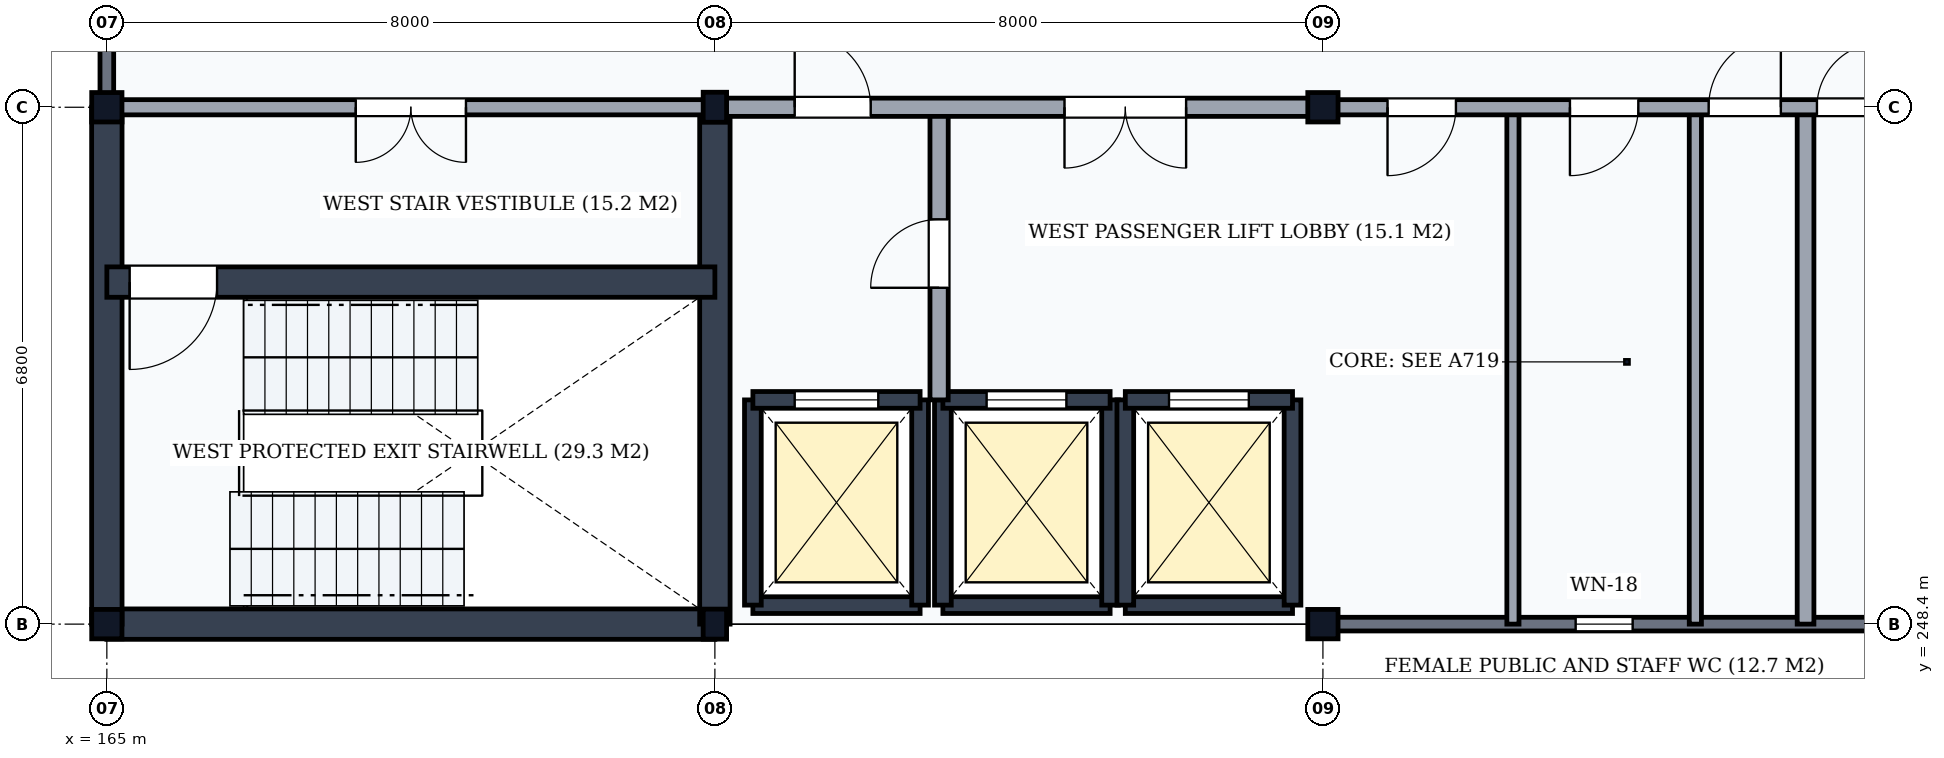
"""IFC4 building model, lengths in metres.
Left out: names, types, materials, properties, quantities, classifications, styles, units other than length and angle.
Written with IfcOpenShell. Run it as: python <this file> out.ifc"""

import sys

from ifc_helpers import new_model, si_unit, direction, frame, frame_2d, origin, origin_2d, place, context, subcontext, project, spatial, rectangle, i_section, extrude, element, fill, save


model = new_model("IFC4")
c1 = context("Model", 3, precision=1e-05, world=origin(), true_north=direction((0.0, 1.0)))
c2 = subcontext(c1, "Body", "Model", "MODEL_VIEW")
j1 = project(units=[si_unit("LENGTHUNIT", "METRE"), si_unit("PLANEANGLEUNIT", "RADIAN")], contexts=[c1])
p1 = place(None, origin())
s1 = spatial("IfcSite", under=j1, at=p1, CompositionType="ELEMENT")
p2 = place(p1, origin())
s2 = spatial("IfcBuilding", under=s1, at=p2, CompositionType="ELEMENT")
p3 = place(p2, frame((0.0, 0.0, 36.0)))
s3 = spatial("IfcBuildingStorey", under=s2, at=p3, CompositionType="ELEMENT", Elevation=36.0)
for number, where, z_axis, x_axis in (
    (1, (165.0, 248.4, 0.0), (0.0, 0.0, 1.0), (1.0, 0.0, 0.0)),
    (2, (165.0, 255.2, 0.0), (0.0, 0.0, 1.0), (1.0, 0.0, 0.0)),
):
    element("IfcColumn", number, at=place(p3, frame(where, z_axis=z_axis, x_axis=x_axis)), inside=s3, PredefinedType="COLUMN", context=c2, shape_type="SweptSolid", body=[
        extrude(i_section(OverallWidth=0.398, OverallDepth=0.387, WebThickness=0.021, FlangeThickness=0.033, FilletRadius=0.015, at=origin_2d()), origin(), (0.0, 0.0, 1.0), 3.9),
    ])
for number, where, z_axis, x_axis in (
    (3, (173.0, 248.4, 0.0), (0.0, 0.0, 1.0), (1.0, 0.0, 0.0)),
    (4, (173.0, 255.2, 0.0), (0.0, 0.0, 1.0), (1.0, 0.0, 0.0)),
):
    element("IfcColumn", number, at=place(p3, frame(where, z_axis=z_axis, x_axis=x_axis)), inside=s3, PredefinedType="COLUMN", context=c2, shape_type="SweptSolid", body=[
        extrude(i_section(OverallWidth=0.308, OverallDepth=0.395, WebThickness=0.021, FlangeThickness=0.04, FilletRadius=0.027, at=origin_2d()), origin(), (0.0, 0.0, 1.0), 3.9),
    ])
for number, where, z_axis, x_axis in (
    (5, (181.0, 248.4, 0.0), (0.0, 0.0, 1.0), (1.0, 0.0, 0.0)),
    (6, (181.0, 255.2, 0.0), (0.0, 0.0, 1.0), (1.0, 0.0, 0.0)),
):
    element("IfcColumn", number, at=place(p3, frame(where, z_axis=z_axis, x_axis=x_axis)), inside=s3, PredefinedType="COLUMN", context=c2, shape_type="SweptSolid", body=[
        extrude(i_section(OverallWidth=0.398, OverallDepth=0.387, WebThickness=0.021, FlangeThickness=0.033, FilletRadius=0.015, at=origin_2d()), origin(), (0.0, 0.0, 1.0), 3.9),
    ])
p4 = place(p3, frame((181.006, 248.4, 0.0), z_axis=(0.0, 0.0, 1.0), x_axis=(1.0, 0.0, 0.0)))
e7 = element("IfcWall", 7, at=p4, inside=s3, PredefinedType="SOLIDWALL", context=c2, shape_type="SweptSolid", body=[
    extrude(rectangle(XDim=7.988, YDim=0.18, at=frame_2d((3.994, 0.0))), origin(), (0.0, 0.0, 1.0), 3.368),
])
p5 = place(p4, frame((3.319, 0.0, 0.85)))
e8 = element("IfcOpeningElement", 8, at=p5, cuts=e7, PredefinedType="OPENING", context=c2, shape_type="SweptSolid", body=[
    extrude(rectangle(XDim=0.75, YDim=2.0, at=frame_2d((0.375, 1.0))), frame((0.0, 0.105, 0.0), z_axis=(0.0, -1.0, 0.0), x_axis=(1.0, 0.0, 0.0)), (0.0, 0.0, 1.0), 0.21),
])
p6 = place(p3, frame((165.0, 255.206, 0.0), z_axis=(0.0, 0.0, 1.0), x_axis=(0.0, 1.0, 0.0)))
e9 = element("IfcWall", 9, at=p6, inside=s3, PredefinedType="SOLIDWALL", context=c2, shape_type="SweptSolid", body=[
    extrude(rectangle(XDim=7.588, YDim=0.18, at=frame_2d((3.794, 0.0))), origin(), (0.0, 0.0, 1.0), 3.408),
])
p7 = place(p3, frame((165.0, 248.4, 0.0), z_axis=(0.0, 0.0, 1.0), x_axis=(1.0, 0.0, 0.0)))
e10 = element("IfcWall", 10, at=p7, inside=s3, PredefinedType="SHEAR", context=c2, shape_type="SweptSolid", body=[
    extrude(rectangle(XDim=8.0, YDim=0.4, at=frame_2d((4.0, 0.0))), origin(), (0.0, 0.0, 1.0), 3.68),
])
for number, where, z_axis, x_axis in (
    (11, (165.0, 248.4, 0.0), (0.0, 0.0, 1.0), (0.0, 1.0, 0.0)),
    (12, (173.0, 248.4, 0.0), (0.0, 0.0, 1.0), (0.0, 1.0, 0.0)),
):
    element("IfcWall", number, at=place(p3, frame(where, z_axis=z_axis, x_axis=x_axis)), inside=s3, PredefinedType="SHEAR", context=c2, shape_type="SweptSolid", body=[
        extrude(rectangle(XDim=6.8, YDim=0.4, at=frame_2d((3.4, 0.0))), origin(), (0.0, 0.0, 1.0), 3.68),
    ])
p8 = place(p3, frame((165.0, 252.9, 0.0), z_axis=(0.0, 0.0, 1.0), x_axis=(1.0, 0.0, 0.0)))
e13 = element("IfcWall", 13, at=p8, inside=s3, PredefinedType="SHEAR", context=c2, shape_type="SweptSolid", body=[
    extrude(rectangle(XDim=8.0, YDim=0.4, at=frame_2d((4.0, 0.0))), origin(), (0.0, 0.0, 1.0), 3.68),
])
p9 = place(p8, frame((0.3, 0.0, 0.0)))
e14 = element("IfcOpeningElement", 14, at=p9, cuts=e13, PredefinedType="OPENING", context=c2, shape_type="SweptSolid", body=[
    extrude(rectangle(XDim=1.15, YDim=2.15, at=frame_2d((0.575, 1.075))), frame((0.0, 0.215, 0.0), z_axis=(0.0, -1.0, 0.0), x_axis=(1.0, 0.0, 0.0)), (0.0, 0.0, 1.0), 0.43),
])
p10 = place(p3, frame((165.0, 255.2, 0.0), z_axis=(0.0, 0.0, 1.0), x_axis=(1.0, 0.0, 0.0)))
e15 = element("IfcWall", 15, at=p10, inside=s3, PredefinedType="PARTITIONING", context=c2, shape_type="SweptSolid", body=[
    extrude(rectangle(XDim=8.0, YDim=0.2, at=frame_2d((4.0, 0.0))), origin(), (0.0, 0.0, 1.0), 3.178),
])
p11 = place(p10, frame((3.275, 0.0, 0.0)))
e16 = element("IfcOpeningElement", 16, at=p11, cuts=e15, PredefinedType="OPENING", context=c2, shape_type="SweptSolid", body=[
    extrude(rectangle(XDim=1.45, YDim=2.2, at=frame_2d((0.725, 1.1))), frame((0.0, 0.115, 0.0), z_axis=(0.0, -1.0, 0.0), x_axis=(1.0, 0.0, 0.0)), (0.0, 0.0, 1.0), 0.23),
])
p12 = place(p3, frame((173.5, 248.65, 0.0), z_axis=(0.0, 0.0, 1.0), x_axis=(1.0, 0.0, 0.0)))
e17 = element("IfcWall", 17, at=p12, inside=s3, PredefinedType="SHEAR", context=c2, shape_type="SweptSolid", body=[
    extrude(rectangle(XDim=2.2, YDim=0.22, at=frame_2d((1.1, 0.0))), origin(), (0.0, 0.0, 1.0), 3.68),
])
for number, where, z_axis, x_axis in (
    (18, (173.5, 248.65, 0.0), (0.0, 0.0, 1.0), (0.0, 1.0, 0.0)),
    (19, (175.7, 248.65, 0.0), (0.0, 0.0, 1.0), (0.0, 1.0, 0.0)),
):
    element("IfcWall", number, at=place(p3, frame(where, z_axis=z_axis, x_axis=x_axis)), inside=s3, PredefinedType="SHEAR", context=c2, shape_type="SweptSolid", body=[
        extrude(rectangle(XDim=2.7, YDim=0.22, at=frame_2d((1.35, 0.0))), origin(), (0.0, 0.0, 1.0), 3.68),
    ])
p13 = place(p3, frame((173.5, 251.35, 0.0), z_axis=(0.0, 0.0, 1.0), x_axis=(1.0, 0.0, 0.0)))
e20 = element("IfcWall", 20, at=p13, inside=s3, PredefinedType="SHEAR", context=c2, shape_type="SweptSolid", body=[
    extrude(rectangle(XDim=2.2, YDim=0.22, at=frame_2d((1.1, 0.0))), origin(), (0.0, 0.0, 1.0), 3.68),
])
p14 = place(p13, frame((0.55, 0.0, 0.0)))
e21 = element("IfcOpeningElement", 21, at=p14, cuts=e20, PredefinedType="OPENING", context=c2, shape_type="SweptSolid", body=[
    extrude(rectangle(XDim=1.1, YDim=2.15, at=frame_2d((0.55, 1.075))), frame((0.0, 0.125, 0.0), z_axis=(0.0, -1.0, 0.0), x_axis=(1.0, 0.0, 0.0)), (0.0, 0.0, 1.0), 0.25),
])
p15 = place(p3, frame((176.0, 248.65, 0.0), z_axis=(0.0, 0.0, 1.0), x_axis=(1.0, 0.0, 0.0)))
e22 = element("IfcWall", 22, at=p15, inside=s3, PredefinedType="SHEAR", context=c2, shape_type="SweptSolid", body=[
    extrude(rectangle(XDim=2.2, YDim=0.22, at=frame_2d((1.1, 0.0))), origin(), (0.0, 0.0, 1.0), 3.68),
])
for number, where, z_axis, x_axis in (
    (23, (176.0, 248.65, 0.0), (0.0, 0.0, 1.0), (0.0, 1.0, 0.0)),
    (24, (178.2, 248.65, 0.0), (0.0, 0.0, 1.0), (0.0, 1.0, 0.0)),
):
    element("IfcWall", number, at=place(p3, frame(where, z_axis=z_axis, x_axis=x_axis)), inside=s3, PredefinedType="SHEAR", context=c2, shape_type="SweptSolid", body=[
        extrude(rectangle(XDim=2.7, YDim=0.22, at=frame_2d((1.35, 0.0))), origin(), (0.0, 0.0, 1.0), 3.68),
    ])
p16 = place(p3, frame((176.0, 251.35, 0.0), z_axis=(0.0, 0.0, 1.0), x_axis=(1.0, 0.0, 0.0)))
e25 = element("IfcWall", 25, at=p16, inside=s3, PredefinedType="SHEAR", context=c2, shape_type="SweptSolid", body=[
    extrude(rectangle(XDim=2.2, YDim=0.22, at=frame_2d((1.1, 0.0))), origin(), (0.0, 0.0, 1.0), 3.68),
])
p17 = place(p16, frame((0.575, 0.0, 0.0)))
e26 = element("IfcOpeningElement", 26, at=p17, cuts=e25, PredefinedType="OPENING", context=c2, shape_type="SweptSolid", body=[
    extrude(rectangle(XDim=1.05, YDim=2.15, at=frame_2d((0.525, 1.075))), frame((0.0, 0.125, 0.0), z_axis=(0.0, -1.0, 0.0), x_axis=(1.0, 0.0, 0.0)), (0.0, 0.0, 1.0), 0.25),
])
p18 = place(p3, frame((178.4, 248.65, 0.0), z_axis=(0.0, 0.0, 1.0), x_axis=(1.0, 0.0, 0.0)))
e27 = element("IfcWall", 27, at=p18, inside=s3, PredefinedType="SHEAR", context=c2, shape_type="SweptSolid", body=[
    extrude(rectangle(XDim=2.2, YDim=0.22, at=frame_2d((1.1, 0.0))), origin(), (0.0, 0.0, 1.0), 3.68),
])
for number, where, z_axis, x_axis in (
    (28, (178.4, 248.65, 0.0), (0.0, 0.0, 1.0), (0.0, 1.0, 0.0)),
    (29, (180.6, 248.65, 0.0), (0.0, 0.0, 1.0), (0.0, 1.0, 0.0)),
):
    element("IfcWall", number, at=place(p3, frame(where, z_axis=z_axis, x_axis=x_axis)), inside=s3, PredefinedType="SHEAR", context=c2, shape_type="SweptSolid", body=[
        extrude(rectangle(XDim=2.7, YDim=0.22, at=frame_2d((1.35, 0.0))), origin(), (0.0, 0.0, 1.0), 3.68),
    ])
p19 = place(p3, frame((178.4, 251.35, 0.0), z_axis=(0.0, 0.0, 1.0), x_axis=(1.0, 0.0, 0.0)))
e30 = element("IfcWall", 30, at=p19, inside=s3, PredefinedType="SHEAR", context=c2, shape_type="SweptSolid", body=[
    extrude(rectangle(XDim=2.2, YDim=0.22, at=frame_2d((1.1, 0.0))), origin(), (0.0, 0.0, 1.0), 3.68),
])
p20 = place(p19, frame((0.575, 0.0, 0.0)))
e31 = element("IfcOpeningElement", 31, at=p20, cuts=e30, PredefinedType="OPENING", context=c2, shape_type="SweptSolid", body=[
    extrude(rectangle(XDim=1.05, YDim=2.15, at=frame_2d((0.525, 1.075))), frame((0.0, 0.125, 0.0), z_axis=(0.0, -1.0, 0.0), x_axis=(1.0, 0.0, 0.0)), (0.0, 0.0, 1.0), 0.25),
])
p21 = place(p3, frame((175.95, 251.35, 0.0), z_axis=(0.0, 0.0, 1.0), x_axis=(0.0, 1.0, 0.0)))
e32 = element("IfcWall", 32, at=p21, inside=s3, PredefinedType="PARTITIONING", context=c2, shape_type="SweptSolid", body=[
    extrude(rectangle(XDim=3.85, YDim=0.24, at=frame_2d((1.925, 0.0))), origin(), (0.0, 0.0, 1.0), 3.68),
])
p22 = place(p21, frame((1.475, 0.0, 0.0)))
e33 = element("IfcOpeningElement", 33, at=p22, cuts=e32, PredefinedType="OPENING", context=c2, shape_type="SweptSolid", body=[
    extrude(rectangle(XDim=0.9, YDim=2.1, at=frame_2d((0.45, 1.05))), frame((0.0, 0.135, 0.0), z_axis=(0.0, -1.0, 0.0), x_axis=(1.0, 0.0, 0.0)), (0.0, 0.0, 1.0), 0.27),
])
for number, where, z_axis, x_axis in (
    (34, (183.5, 248.4, 0.0), (0.0, 0.0, 1.0), (0.0, 1.0, 0.0)),
    (35, (185.9, 248.4, 0.0), (0.0, 0.0, 1.0), (0.0, 1.0, 0.0)),
):
    element("IfcWall", number, at=place(p3, frame(where, z_axis=z_axis, x_axis=x_axis)), inside=s3, PredefinedType="PARTITIONING", context=c2, shape_type="SweptSolid", body=[
        extrude(rectangle(XDim=6.8, YDim=0.16, at=frame_2d((3.4, 0.0))), origin(), (0.0, 0.0, 1.0), 3.68),
    ])
p23 = place(p3, frame((187.35, 248.4, 0.0), z_axis=(0.0, 0.0, 1.0), x_axis=(0.0, 1.0, 0.0)))
e36 = element("IfcWall", 36, at=p23, inside=s3, PredefinedType="PARTITIONING", context=c2, shape_type="SweptSolid", body=[
    extrude(rectangle(XDim=6.8, YDim=0.22, at=frame_2d((3.4, 0.0))), origin(), (0.0, 0.0, 1.0), 3.68),
])
p24 = place(p3, frame((173.0, 255.2, 0.0), z_axis=(0.0, 0.0, 1.0), x_axis=(1.0, 0.0, 0.0)))
e37 = element("IfcWall", 37, at=p24, inside=s3, PredefinedType="PARTITIONING", context=c2, shape_type="SweptSolid", body=[
    extrude(rectangle(XDim=8.0, YDim=0.24, at=frame_2d((4.0, 0.0))), origin(), (0.0, 0.0, 1.0), 3.178),
])
p25 = place(p24, frame((1.05, 0.0, 0.0)))
e38 = element("IfcOpeningElement", 38, at=p25, cuts=e37, PredefinedType="OPENING", context=c2, shape_type="SweptSolid", body=[
    extrude(rectangle(XDim=1.0, YDim=2.1, at=frame_2d((0.5, 1.05))), frame((0.0, 0.135, 0.0), z_axis=(0.0, -1.0, 0.0), x_axis=(1.0, 0.0, 0.0)), (0.0, 0.0, 1.0), 0.27),
])
p26 = place(p24, frame((4.6, 0.0, 0.0)))
e39 = element("IfcOpeningElement", 39, at=p26, cuts=e37, PredefinedType="OPENING", context=c2, shape_type="SweptSolid", body=[
    extrude(rectangle(XDim=1.6, YDim=2.25, at=frame_2d((0.8, 1.125))), frame((0.0, 0.135, 0.0), z_axis=(0.0, -1.0, 0.0), x_axis=(1.0, 0.0, 0.0)), (0.0, 0.0, 1.0), 0.27),
])
p27 = place(p3, frame((181.0, 255.2, 0.0), z_axis=(0.0, 0.0, 1.0), x_axis=(1.0, 0.0, 0.0)))
e40 = element("IfcWall", 40, at=p27, inside=s3, PredefinedType="PARTITIONING", context=c2, shape_type="SweptSolid", body=[
    extrude(rectangle(XDim=8.0, YDim=0.2, at=frame_2d((4.0, 0.0))), origin(), (0.0, 0.0, 1.0), 3.178),
])
p28 = place(p27, frame((0.85, 0.0, 0.0)))
e41 = element("IfcOpeningElement", 41, at=p28, cuts=e40, PredefinedType="OPENING", context=c2, shape_type="SweptSolid", body=[
    extrude(rectangle(XDim=0.9, YDim=2.1, at=frame_2d((0.45, 1.05))), frame((0.0, 0.115, 0.0), z_axis=(0.0, -1.0, 0.0), x_axis=(1.0, 0.0, 0.0)), (0.0, 0.0, 1.0), 0.23),
])
p29 = place(p27, frame((3.25, 0.0, 0.0)))
e42 = element("IfcOpeningElement", 42, at=p29, cuts=e40, PredefinedType="OPENING", context=c2, shape_type="SweptSolid", body=[
    extrude(rectangle(XDim=0.9, YDim=2.1, at=frame_2d((0.45, 1.05))), frame((0.0, 0.115, 0.0), z_axis=(0.0, -1.0, 0.0), x_axis=(1.0, 0.0, 0.0)), (0.0, 0.0, 1.0), 0.23),
])
p30 = place(p27, frame((5.075, 0.0, 0.0)))
e43 = element("IfcOpeningElement", 43, at=p30, cuts=e40, PredefinedType="OPENING", context=c2, shape_type="SweptSolid", body=[
    extrude(rectangle(XDim=0.95, YDim=2.1, at=frame_2d((0.475, 1.05))), frame((0.0, 0.115, 0.0), z_axis=(0.0, -1.0, 0.0), x_axis=(1.0, 0.0, 0.0)), (0.0, 0.0, 1.0), 0.23),
])
p31 = place(p27, frame((6.5, 0.0, 0.0)))
e44 = element("IfcOpeningElement", 44, at=p31, cuts=e40, PredefinedType="OPENING", context=c2, shape_type="SweptSolid", body=[
    extrude(rectangle(XDim=0.85, YDim=2.1, at=frame_2d((0.425, 1.05))), frame((0.0, 0.115, 0.0), z_axis=(0.0, -1.0, 0.0), x_axis=(1.0, 0.0, 0.0)), (0.0, 0.0, 1.0), 0.23),
])
p32 = place(p5, origin())
e45 = element("IfcWindow", 45, at=p32, inside=s3, PartitioningType="SINGLE_PANEL", PredefinedType="WINDOW", context=c2, shape_type="SweptSolid", body=[
    extrude(rectangle(XDim=0.75, YDim=2.0, at=frame_2d((0.375, 1.0))), frame((0.0, 0.03, 0.0), z_axis=(0.0, -1.0, 0.0), x_axis=(1.0, 0.0, 0.0)), (0.0, 0.0, 1.0), 0.06),
])
fill(e8, e45)
p33 = place(p9, frame((1.15, 0.0, 0.0), z_axis=(0.0, 0.0, 1.0), x_axis=(-1.0, 0.0, 0.0)))
e46 = element("IfcDoor", 46, at=p33, inside=s3, OperationType="SINGLE_SWING_RIGHT", PredefinedType="DOOR", context=c2, shape_type="SweptSolid", body=[
    extrude(rectangle(XDim=1.15, YDim=2.15, at=frame_2d((0.575, 1.075))), frame((0.0, 0.025, 0.0), z_axis=(0.0, -1.0, 0.0), x_axis=(1.0, 0.0, 0.0)), (0.0, 0.0, 1.0), 0.05),
])
fill(e14, e46)
p34 = place(p11, frame((1.45, 0.0, 0.0), z_axis=(0.0, 0.0, 1.0), x_axis=(-1.0, 0.0, 0.0)))
e47 = element("IfcDoor", 47, at=p34, inside=s3, OperationType="DOUBLE_DOOR_SINGLE_SWING", PredefinedType="DOOR", context=c2, shape_type="SweptSolid", body=[
    extrude(rectangle(XDim=1.45, YDim=2.2, at=frame_2d((0.725, 1.1))), frame((0.0, 0.025, 0.0), z_axis=(0.0, -1.0, 0.0), x_axis=(1.0, 0.0, 0.0)), (0.0, 0.0, 1.0), 0.05),
])
fill(e16, e47)
p35 = place(p14, origin())
e48 = element("IfcDoor", 48, at=p35, inside=s3, OperationType="DOUBLE_DOOR_SLIDING", PredefinedType="USERDEFINED", context=c2, shape_type="SweptSolid", body=[
    extrude(rectangle(XDim=1.1, YDim=2.15, at=frame_2d((0.55, 1.075))), frame((0.0, 0.025, 0.0), z_axis=(0.0, -1.0, 0.0), x_axis=(1.0, 0.0, 0.0)), (0.0, 0.0, 1.0), 0.05),
])
fill(e21, e48)
p36 = place(p17, origin())
e49 = element("IfcDoor", 49, at=p36, inside=s3, OperationType="DOUBLE_DOOR_SLIDING", PredefinedType="USERDEFINED", context=c2, shape_type="SweptSolid", body=[
    extrude(rectangle(XDim=1.05, YDim=2.15, at=frame_2d((0.525, 1.075))), frame((0.0, 0.025, 0.0), z_axis=(0.0, -1.0, 0.0), x_axis=(1.0, 0.0, 0.0)), (0.0, 0.0, 1.0), 0.05),
])
fill(e26, e49)
p37 = place(p20, origin())
e50 = element("IfcDoor", 50, at=p37, inside=s3, OperationType="DOUBLE_DOOR_SLIDING", PredefinedType="USERDEFINED", context=c2, shape_type="SweptSolid", body=[
    extrude(rectangle(XDim=1.05, YDim=2.15, at=frame_2d((0.525, 1.075))), frame((0.0, 0.025, 0.0), z_axis=(0.0, -1.0, 0.0), x_axis=(1.0, 0.0, 0.0)), (0.0, 0.0, 1.0), 0.05),
])
fill(e31, e50)
p38 = place(p22, origin())
e51 = element("IfcDoor", 51, at=p38, inside=s3, OperationType="SINGLE_SWING_LEFT", PredefinedType="DOOR", context=c2, shape_type="SweptSolid", body=[
    extrude(rectangle(XDim=0.9, YDim=2.1, at=frame_2d((0.45, 1.05))), frame((0.0, 0.025, 0.0), z_axis=(0.0, -1.0, 0.0), x_axis=(1.0, 0.0, 0.0)), (0.0, 0.0, 1.0), 0.05),
])
fill(e33, e51)
p39 = place(p25, origin())
e52 = element("IfcDoor", 52, at=p39, inside=s3, OperationType="SINGLE_SWING_LEFT", PredefinedType="DOOR", context=c2, shape_type="SweptSolid", body=[
    extrude(rectangle(XDim=1.0, YDim=2.1, at=frame_2d((0.5, 1.05))), frame((0.0, 0.025, 0.0), z_axis=(0.0, -1.0, 0.0), x_axis=(1.0, 0.0, 0.0)), (0.0, 0.0, 1.0), 0.05),
])
fill(e38, e52)
p40 = place(p26, frame((1.6, 0.0, 0.0), z_axis=(0.0, 0.0, 1.0), x_axis=(-1.0, 0.0, 0.0)))
e53 = element("IfcDoor", 53, at=p40, inside=s3, OperationType="DOUBLE_DOOR_SINGLE_SWING", PredefinedType="DOOR", context=c2, shape_type="SweptSolid", body=[
    extrude(rectangle(XDim=1.6, YDim=2.25, at=frame_2d((0.8, 1.125))), frame((0.0, 0.025, 0.0), z_axis=(0.0, -1.0, 0.0), x_axis=(1.0, 0.0, 0.0)), (0.0, 0.0, 1.0), 0.05),
])
fill(e39, e53)
p41 = place(p28, frame((0.9, 0.0, 0.0), z_axis=(0.0, 0.0, 1.0), x_axis=(-1.0, 0.0, 0.0)))
e54 = element("IfcDoor", 54, at=p41, inside=s3, OperationType="SINGLE_SWING_RIGHT", PredefinedType="DOOR", context=c2, shape_type="SweptSolid", body=[
    extrude(rectangle(XDim=0.9, YDim=2.1, at=frame_2d((0.45, 1.05))), frame((0.0, 0.025, 0.0), z_axis=(0.0, -1.0, 0.0), x_axis=(1.0, 0.0, 0.0)), (0.0, 0.0, 1.0), 0.05),
])
fill(e41, e54)
p42 = place(p29, frame((0.9, 0.0, 0.0), z_axis=(0.0, 0.0, 1.0), x_axis=(-1.0, 0.0, 0.0)))
e55 = element("IfcDoor", 55, at=p42, inside=s3, OperationType="SINGLE_SWING_RIGHT", PredefinedType="DOOR", context=c2, shape_type="SweptSolid", body=[
    extrude(rectangle(XDim=0.9, YDim=2.1, at=frame_2d((0.45, 1.05))), frame((0.0, 0.025, 0.0), z_axis=(0.0, -1.0, 0.0), x_axis=(1.0, 0.0, 0.0)), (0.0, 0.0, 1.0), 0.05),
])
fill(e42, e55)
p43 = place(p30, frame((0.95, 0.0, 0.0), z_axis=(0.0, 0.0, 1.0), x_axis=(-1.0, 0.0, 0.0)))
e56 = element("IfcDoor", 56, at=p43, inside=s3, OperationType="SINGLE_SWING_LEFT", PredefinedType="DOOR", context=c2, shape_type="SweptSolid", body=[
    extrude(rectangle(XDim=0.95, YDim=2.1, at=frame_2d((0.475, 1.05))), frame((0.0, 0.025, 0.0), z_axis=(0.0, -1.0, 0.0), x_axis=(1.0, 0.0, 0.0)), (0.0, 0.0, 1.0), 0.05),
])
fill(e43, e56)
p44 = place(p31, frame((0.85, 0.0, 0.0), z_axis=(0.0, 0.0, 1.0), x_axis=(-1.0, 0.0, 0.0)))
e57 = element("IfcDoor", 57, at=p44, inside=s3, OperationType="SINGLE_SWING_LEFT", PredefinedType="DOOR", context=c2, shape_type="SweptSolid", body=[
    extrude(rectangle(XDim=0.85, YDim=2.1, at=frame_2d((0.425, 1.05))), frame((0.0, 0.025, 0.0), z_axis=(0.0, -1.0, 0.0), x_axis=(1.0, 0.0, 0.0)), (0.0, 0.0, 1.0), 0.05),
])
fill(e44, e57)
save(model, sys.argv[1])
